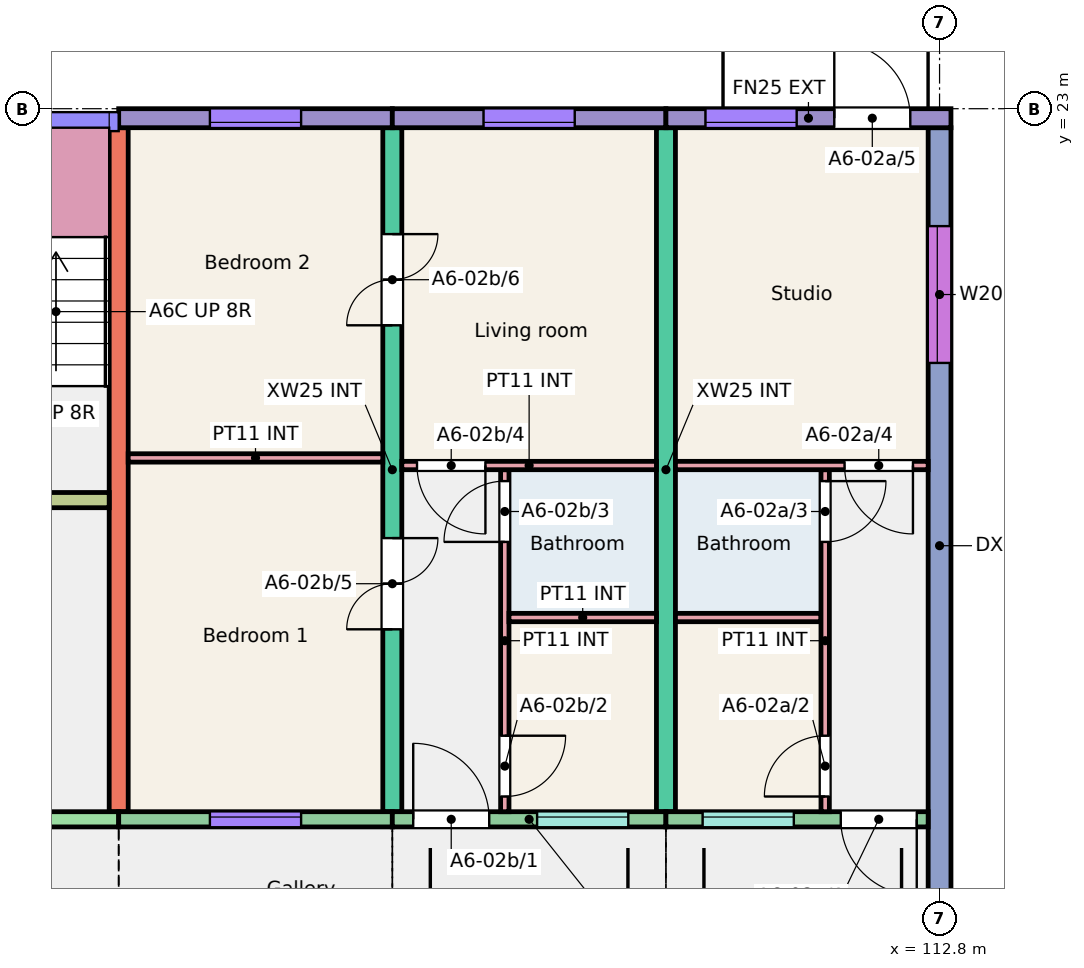
"""IFC4 building model, lengths in metres.
Left out: names, types, materials, properties, quantities, classifications, styles, units other than length and angle.
Written with IfcOpenShell. Run it as: python <this file> out.ifc"""

import sys

from ifc_helpers import new_model, si_unit, direction, frame, frame_2d, origin, place, context, subcontext, project, spatial, rectangle, extrude, element, fill, save


model = new_model("IFC4")
c1 = context("Model", 3, precision=1e-05, world=origin(), true_north=direction((0.0, 1.0)))
c2 = subcontext(c1, "Body", "Model", "MODEL_VIEW")
j1 = project(units=[si_unit("LENGTHUNIT", "METRE"), si_unit("PLANEANGLEUNIT", "RADIAN")], contexts=[c1])
p1 = place(None, origin())
s1 = spatial("IfcSite", under=j1, at=p1, CompositionType="ELEMENT")
p2 = place(p1, origin())
s2 = spatial("IfcBuilding", under=s1, at=p2, CompositionType="ELEMENT")
p3 = place(p2, frame((0.0, 0.0, 6.0)))
s3 = spatial("IfcBuildingStorey", under=s2, at=p3, CompositionType="ELEMENT", Elevation=6.0)
p4 = place(p3, frame((102.0, 13.75, 0.0), z_axis=(0.0, 0.0, 1.0), x_axis=(0.0, 1.0, 0.0)))
e1 = element("IfcWall", 1, at=p4, inside=s3, PredefinedType="SHEAR", context=c2, shape_type="SweptSolid", body=[
    extrude(rectangle(XDim=9.0, YDim=0.25, at=frame_2d((4.5, 0.0))), origin(), (0.0, 0.0, 1.0), 3.0),
])
p5 = place(p3, frame((105.6, 13.75, 0.0), z_axis=(0.0, 0.0, 1.0), x_axis=(0.0, 1.0, 0.0)))
e2 = element("IfcWall", 2, at=p5, inside=s3, PredefinedType="SHEAR", context=c2, shape_type="SweptSolid", body=[
    extrude(rectangle(XDim=9.0, YDim=0.25, at=frame_2d((4.5, 0.0))), origin(), (0.0, 0.0, 1.0), 3.0),
])
p6 = place(p5, frame((2.4, 0.0, 0.0)))
e3 = element("IfcOpeningElement", 3, at=p6, cuts=e2, PredefinedType="OPENING", context=c2, shape_type="SweptSolid", body=[
    extrude(rectangle(XDim=1.2, YDim=2.1, at=frame_2d((0.6, 1.05))), frame((0.0, 0.135, 0.0), z_axis=(0.0, -1.0, 0.0), x_axis=(1.0, 0.0, 0.0)), (0.0, 0.0, 1.0), 0.27),
])
p7 = place(p5, frame((6.4, 0.0, 0.0)))
e4 = element("IfcOpeningElement", 4, at=p7, cuts=e2, PredefinedType="OPENING", context=c2, shape_type="SweptSolid", body=[
    extrude(rectangle(XDim=1.2, YDim=2.1, at=frame_2d((0.6, 1.05))), frame((0.0, 0.135, 0.0), z_axis=(0.0, -1.0, 0.0), x_axis=(1.0, 0.0, 0.0)), (0.0, 0.0, 1.0), 0.27),
])
p8 = place(p3, frame((109.2, 13.75, 0.0), z_axis=(0.0, 0.0, 1.0), x_axis=(0.0, 1.0, 0.0)))
e5 = element("IfcWall", 5, at=p8, inside=s3, PredefinedType="SHEAR", context=c2, shape_type="SweptSolid", body=[
    extrude(rectangle(XDim=9.0, YDim=0.25, at=frame_2d((4.5, 0.0))), origin(), (0.0, 0.0, 1.0), 3.0),
])
p9 = place(p3, frame((112.8, 11.75, 0.0), z_axis=(0.0, 0.0, 1.0), x_axis=(0.0, 1.0, 0.0)))
e6 = element("IfcWall", 6, at=p9, inside=s3, PredefinedType="SHEAR", context=c2, shape_type="SweptSolid", body=[
    extrude(rectangle(XDim=11.0, YDim=0.3, at=frame_2d((5.5, 0.0))), origin(), (0.0, 0.0, 1.0), 3.0),
])
p10 = place(p9, frame((7.905, 0.0, 0.9)))
e7 = element("IfcOpeningElement", 7, at=p10, cuts=e6, PredefinedType="OPENING", context=c2, shape_type="SweptSolid", body=[
    extrude(rectangle(XDim=1.8, YDim=1.5, at=frame_2d((0.9, 0.75))), frame((0.0, 0.16, 0.0), z_axis=(0.0, -1.0, 0.0), x_axis=(1.0, 0.0, 0.0)), (0.0, 0.0, 1.0), 0.32),
])
p11 = place(p3, frame((96.15, 13.65, 0.0), z_axis=(0.0, 0.0, 1.0), x_axis=(1.0, 0.0, 0.0)))
e8 = element("IfcWall", 8, at=p11, inside=s3, PredefinedType="SHEAR", context=c2, shape_type="SweptSolid", body=[
    extrude(rectangle(XDim=5.85, YDim=0.2, at=frame_2d((2.925, 0.0))), origin(), (0.0, 0.0, 1.0), 3.0),
])
p12 = place(p11, frame((2.312, 0.0, 0.0)))
e9 = element("IfcOpeningElement", 9, at=p12, cuts=e8, PredefinedType="OPENING", context=c2, shape_type="SweptSolid", body=[
    extrude(rectangle(XDim=1.1, YDim=2.1, at=frame_2d((0.55, 1.05))), frame((0.0, 0.11, 0.0), z_axis=(0.0, -1.0, 0.0), x_axis=(1.0, 0.0, 0.0)), (0.0, 0.0, 1.0), 0.22),
])
p13 = place(p3, frame((96.15, 17.85, 0.0), z_axis=(0.0, 0.0, 1.0), x_axis=(1.0, 0.0, 0.0)))
e10 = element("IfcWall", 10, at=p13, inside=s3, PredefinedType="SHEAR", context=c2, shape_type="SweptSolid", body=[
    extrude(rectangle(XDim=5.725, YDim=0.2, at=frame_2d((2.863, 0.0))), origin(), (0.0, 0.0, 1.0), 3.0),
])
p14 = place(p13, frame((3.775, 0.0, 0.0)))
e11 = element("IfcOpeningElement", 11, at=p14, cuts=e10, PredefinedType="OPENING", context=c2, shape_type="SweptSolid", body=[
    extrude(rectangle(XDim=1.0, YDim=2.1, at=frame_2d((0.5, 1.05))), frame((0.0, 0.11, 0.0), z_axis=(0.0, -1.0, 0.0), x_axis=(1.0, 0.0, 0.0)), (0.0, 0.0, 1.0), 0.22),
])
p15 = place(p13, frame((0.762, 0.0, 0.0)))
e12 = element("IfcOpeningElement", 12, at=p15, cuts=e10, PredefinedType="OPENING", context=c2, shape_type="SweptSolid", body=[
    extrude(rectangle(XDim=1.1, YDim=2.1, at=frame_2d((0.55, 1.05))), frame((0.0, 0.11, 0.0), z_axis=(0.0, -1.0, 0.0), x_axis=(1.0, 0.0, 0.0)), (0.0, 0.0, 1.0), 0.22),
])
p16 = place(p3, frame((102.0, 22.875, 0.0), z_axis=(0.0, 0.0, 1.0), x_axis=(1.0, 0.0, 0.0)))
e13 = element("IfcWall", 13, at=p16, inside=s3, PredefinedType="SOLIDWALL", context=c2, shape_type="SweptSolid", body=[
    extrude(rectangle(XDim=3.6, YDim=0.25, at=frame_2d((1.8, 0.0))), origin(), (0.0, 0.0, 1.0), 3.0),
])
p17 = place(p16, frame((1.2, 0.0, 0.8)))
e14 = element("IfcOpeningElement", 14, at=p17, cuts=e13, PredefinedType="OPENING", context=c2, shape_type="SweptSolid", body=[
    extrude(rectangle(XDim=1.2, YDim=1.6, at=frame_2d((0.6, 0.8))), frame((0.0, 0.135, 0.0), z_axis=(0.0, -1.0, 0.0), x_axis=(1.0, 0.0, 0.0)), (0.0, 0.0, 1.0), 0.27),
])
p18 = place(p3, frame((102.0, 13.65, 0.0), z_axis=(0.0, 0.0, 1.0), x_axis=(1.0, 0.0, 0.0)))
e15 = element("IfcWall", 15, at=p18, inside=s3, PredefinedType="SOLIDWALL", context=c2, shape_type="SweptSolid", body=[
    extrude(rectangle(XDim=3.6, YDim=0.2, at=frame_2d((1.8, 0.0))), origin(), (0.0, 0.0, 1.0), 3.0),
])
p19 = place(p18, frame((1.2, 0.0, 0.8)))
e16 = element("IfcOpeningElement", 16, at=p19, cuts=e15, PredefinedType="OPENING", context=c2, shape_type="SweptSolid", body=[
    extrude(rectangle(XDim=1.2, YDim=1.6, at=frame_2d((0.6, 0.8))), frame((0.0, 0.11, 0.0), z_axis=(0.0, -1.0, 0.0), x_axis=(1.0, 0.0, 0.0)), (0.0, 0.0, 1.0), 0.22),
])
p20 = place(p3, frame((105.6, 22.875, 0.0), z_axis=(0.0, 0.0, 1.0), x_axis=(1.0, 0.0, 0.0)))
e17 = element("IfcWall", 17, at=p20, inside=s3, PredefinedType="SOLIDWALL", context=c2, shape_type="SweptSolid", body=[
    extrude(rectangle(XDim=3.6, YDim=0.25, at=frame_2d((1.8, 0.0))), origin(), (0.0, 0.0, 1.0), 3.0),
])
p21 = place(p20, frame((1.2, 0.0, 0.8)))
e18 = element("IfcOpeningElement", 18, at=p21, cuts=e17, PredefinedType="OPENING", context=c2, shape_type="SweptSolid", body=[
    extrude(rectangle(XDim=1.2, YDim=1.6, at=frame_2d((0.6, 0.8))), frame((0.0, 0.135, 0.0), z_axis=(0.0, -1.0, 0.0), x_axis=(1.0, 0.0, 0.0)), (0.0, 0.0, 1.0), 0.27),
])
p22 = place(p3, frame((105.6, 13.65, 0.0), z_axis=(0.0, 0.0, 1.0), x_axis=(1.0, 0.0, 0.0)))
e19 = element("IfcWall", 19, at=p22, inside=s3, PredefinedType="SOLIDWALL", context=c2, shape_type="SweptSolid", body=[
    extrude(rectangle(XDim=3.6, YDim=0.2, at=frame_2d((1.8, 0.0))), origin(), (0.0, 0.0, 1.0), 3.0),
])
p23 = place(p22, frame((1.905, 0.0, 1.1)))
e20 = element("IfcOpeningElement", 20, at=p23, cuts=e19, PredefinedType="OPENING", context=c2, shape_type="SweptSolid", body=[
    extrude(rectangle(XDim=1.2, YDim=1.3, at=frame_2d((0.6, 0.65))), frame((0.0, 0.11, 0.0), z_axis=(0.0, -1.0, 0.0), x_axis=(1.0, 0.0, 0.0)), (0.0, 0.0, 1.0), 0.22),
])
p24 = place(p22, frame((0.275, 0.0, 0.0)))
e21 = element("IfcOpeningElement", 21, at=p24, cuts=e19, PredefinedType="OPENING", context=c2, shape_type="SweptSolid", body=[
    extrude(rectangle(XDim=1.0, YDim=2.1, at=frame_2d((0.5, 1.05))), frame((0.0, 0.11, 0.0), z_axis=(0.0, -1.0, 0.0), x_axis=(1.0, 0.0, 0.0)), (0.0, 0.0, 1.0), 0.22),
])
p25 = place(p3, frame((109.2, 22.875, 0.0), z_axis=(0.0, 0.0, 1.0), x_axis=(1.0, 0.0, 0.0)))
e22 = element("IfcWall", 22, at=p25, inside=s3, PredefinedType="SOLIDWALL", context=c2, shape_type="SweptSolid", body=[
    extrude(rectangle(XDim=3.75, YDim=0.25, at=frame_2d((1.875, 0.0))), origin(), (0.0, 0.0, 1.0), 3.0),
])
p26 = place(p25, frame((0.52, 0.0, 0.8)))
e23 = element("IfcOpeningElement", 23, at=p26, cuts=e22, PredefinedType="OPENING", context=c2, shape_type="SweptSolid", body=[
    extrude(rectangle(XDim=1.2, YDim=1.6, at=frame_2d((0.6, 0.8))), frame((0.0, 0.135, 0.0), z_axis=(0.0, -1.0, 0.0), x_axis=(1.0, 0.0, 0.0)), (0.0, 0.0, 1.0), 0.27),
])
p27 = place(p25, frame((2.215, 0.0, 0.0)))
e24 = element("IfcOpeningElement", 24, at=p27, cuts=e22, PredefinedType="OPENING", context=c2, shape_type="SweptSolid", body=[
    extrude(rectangle(XDim=1.0, YDim=2.1, at=frame_2d((0.5, 1.05))), frame((0.0, 0.135, 0.0), z_axis=(0.0, -1.0, 0.0), x_axis=(1.0, 0.0, 0.0)), (0.0, 0.0, 1.0), 0.27),
])
p28 = place(p3, frame((109.2, 13.65, 0.0), z_axis=(0.0, 0.0, 1.0), x_axis=(1.0, 0.0, 0.0)))
e25 = element("IfcWall", 25, at=p28, inside=s3, PredefinedType="SOLIDWALL", context=c2, shape_type="SweptSolid", body=[
    extrude(rectangle(XDim=3.45, YDim=0.2, at=frame_2d((1.725, 0.0))), origin(), (0.0, 0.0, 1.0), 3.0),
])
p29 = place(p28, frame((0.482, 0.0, 1.1)))
e26 = element("IfcOpeningElement", 26, at=p29, cuts=e25, PredefinedType="OPENING", context=c2, shape_type="SweptSolid", body=[
    extrude(rectangle(XDim=1.2, YDim=1.3, at=frame_2d((0.6, 0.65))), frame((0.0, 0.11, 0.0), z_axis=(0.0, -1.0, 0.0), x_axis=(1.0, 0.0, 0.0)), (0.0, 0.0, 1.0), 0.22),
])
p30 = place(p28, frame((2.3, 0.0, 0.0)))
e27 = element("IfcOpeningElement", 27, at=p30, cuts=e25, PredefinedType="OPENING", context=c2, shape_type="SweptSolid", body=[
    extrude(rectangle(XDim=1.0, YDim=2.1, at=frame_2d((0.5, 1.05))), frame((0.0, 0.11, 0.0), z_axis=(0.0, -1.0, 0.0), x_axis=(1.0, 0.0, 0.0)), (0.0, 0.0, 1.0), 0.22),
])
p31 = place(p3, frame((109.325, 16.305, 0.0), z_axis=(0.0, 0.0, 1.0), x_axis=(1.0, 0.0, 0.0)))
e28 = element("IfcWall", 28, at=p31, inside=s3, PredefinedType="PARTITIONING", context=c2, shape_type="SweptSolid", body=[
    extrude(rectangle(XDim=1.915, YDim=0.11, at=frame_2d((0.958, 0.0))), origin(), (0.0, 0.0, 1.0), 2.8),
])
p32 = place(p3, frame((111.295, 13.75, 0.0), z_axis=(0.0, 0.0, 1.0), x_axis=(0.0, 1.0, 0.0)))
e29 = element("IfcWall", 29, at=p32, inside=s3, PredefinedType="PARTITIONING", context=c2, shape_type="SweptSolid", body=[
    extrude(rectangle(XDim=4.5, YDim=0.11, at=frame_2d((2.25, 0.0))), origin(), (0.0, 0.0, 1.0), 2.8),
])
p33 = place(p32, frame((0.2, 0.0, 0.0)))
e30 = element("IfcOpeningElement", 30, at=p33, cuts=e29, PredefinedType="OPENING", context=c2, shape_type="SweptSolid", body=[
    extrude(rectangle(XDim=0.8, YDim=2.1, at=frame_2d((0.4, 1.05))), frame((0.0, 0.065, 0.0), z_axis=(0.0, -1.0, 0.0), x_axis=(1.0, 0.0, 0.0)), (0.0, 0.0, 1.0), 0.13),
])
p34 = place(p32, frame((3.55, 0.0, 0.0)))
e31 = element("IfcOpeningElement", 31, at=p34, cuts=e29, PredefinedType="OPENING", context=c2, shape_type="SweptSolid", body=[
    extrude(rectangle(XDim=0.8, YDim=2.1, at=frame_2d((0.4, 1.05))), frame((0.0, 0.065, 0.0), z_axis=(0.0, -1.0, 0.0), x_axis=(1.0, 0.0, 0.0)), (0.0, 0.0, 1.0), 0.13),
])
p35 = place(p3, frame((109.325, 18.305, 0.0), z_axis=(0.0, 0.0, 1.0), x_axis=(1.0, 0.0, 0.0)))
e32 = element("IfcWall", 32, at=p35, inside=s3, PredefinedType="PARTITIONING", context=c2, shape_type="SweptSolid", body=[
    extrude(rectangle(XDim=3.325, YDim=0.11, at=frame_2d((1.663, 0.0))), origin(), (0.0, 0.0, 1.0), 2.8),
])
p36 = place(p35, frame((2.225, 0.0, 0.0)))
e33 = element("IfcOpeningElement", 33, at=p36, cuts=e32, PredefinedType="OPENING", context=c2, shape_type="SweptSolid", body=[
    extrude(rectangle(XDim=0.9, YDim=2.1, at=frame_2d((0.45, 1.05))), frame((0.0, 0.065, 0.0), z_axis=(0.0, -1.0, 0.0), x_axis=(1.0, 0.0, 0.0)), (0.0, 0.0, 1.0), 0.13),
])
p37 = place(p3, frame((107.08, 13.75, 0.0), z_axis=(0.0, 0.0, 1.0), x_axis=(0.0, 1.0, 0.0)))
e34 = element("IfcWall", 34, at=p37, inside=s3, PredefinedType="PARTITIONING", context=c2, shape_type="SweptSolid", body=[
    extrude(rectangle(XDim=4.5, YDim=0.11, at=frame_2d((2.25, 0.0))), origin(), (0.0, 0.0, 1.0), 2.8),
])
p38 = place(p37, frame((0.2, 0.0, 0.0)))
e35 = element("IfcOpeningElement", 35, at=p38, cuts=e34, PredefinedType="OPENING", context=c2, shape_type="SweptSolid", body=[
    extrude(rectangle(XDim=0.8, YDim=2.1, at=frame_2d((0.4, 1.05))), frame((0.0, 0.065, 0.0), z_axis=(0.0, -1.0, 0.0), x_axis=(1.0, 0.0, 0.0)), (0.0, 0.0, 1.0), 0.13),
])
p39 = place(p37, frame((3.55, 0.0, 0.0)))
e36 = element("IfcOpeningElement", 36, at=p39, cuts=e34, PredefinedType="OPENING", context=c2, shape_type="SweptSolid", body=[
    extrude(rectangle(XDim=0.8, YDim=2.1, at=frame_2d((0.4, 1.05))), frame((0.0, 0.065, 0.0), z_axis=(0.0, -1.0, 0.0), x_axis=(1.0, 0.0, 0.0)), (0.0, 0.0, 1.0), 0.13),
])
p40 = place(p3, frame((107.135, 16.305, 0.0), z_axis=(0.0, 0.0, 1.0), x_axis=(1.0, 0.0, 0.0)))
e37 = element("IfcWall", 37, at=p40, inside=s3, PredefinedType="PARTITIONING", context=c2, shape_type="SweptSolid", body=[
    extrude(rectangle(XDim=1.94, YDim=0.11, at=frame_2d((0.97, 0.0))), origin(), (0.0, 0.0, 1.0), 2.8),
])
p41 = place(p3, frame((105.725, 18.305, 0.0), z_axis=(0.0, 0.0, 1.0), x_axis=(1.0, 0.0, 0.0)))
e38 = element("IfcWall", 38, at=p41, inside=s3, PredefinedType="PARTITIONING", context=c2, shape_type="SweptSolid", body=[
    extrude(rectangle(XDim=3.35, YDim=0.11, at=frame_2d((1.675, 0.0))), origin(), (0.0, 0.0, 1.0), 2.8),
])
p42 = place(p41, frame((0.2, 0.0, 0.0)))
e39 = element("IfcOpeningElement", 39, at=p42, cuts=e38, PredefinedType="OPENING", context=c2, shape_type="SweptSolid", body=[
    extrude(rectangle(XDim=0.9, YDim=2.1, at=frame_2d((0.45, 1.05))), frame((0.0, 0.065, 0.0), z_axis=(0.0, -1.0, 0.0), x_axis=(1.0, 0.0, 0.0)), (0.0, 0.0, 1.0), 0.13),
])
p43 = place(p3, frame((102.125, 18.405, 0.0), z_axis=(0.0, 0.0, 1.0), x_axis=(1.0, 0.0, 0.0)))
e40 = element("IfcWall", 40, at=p43, inside=s3, PredefinedType="PARTITIONING", context=c2, shape_type="SweptSolid", body=[
    extrude(rectangle(XDim=3.35, YDim=0.11, at=frame_2d((1.675, 0.0))), origin(), (0.0, 0.0, 1.0), 2.8),
])
p44 = place(p29, origin())
e41 = element("IfcWindow", 41, at=p44, inside=s3, PartitioningType="SINGLE_PANEL", PredefinedType="WINDOW", context=c2, shape_type="SweptSolid", body=[
    extrude(rectangle(XDim=1.2, YDim=1.3, at=frame_2d((0.6, 0.65))), frame((0.0, 0.06, 0.0), z_axis=(0.0, -1.0, 0.0), x_axis=(1.0, 0.0, 0.0)), (0.0, 0.0, 1.0), 0.06),
])
fill(e26, e41)
p45 = place(p26, origin())
e42 = element("IfcWindow", 42, at=p45, inside=s3, PartitioningType="SINGLE_PANEL", PredefinedType="WINDOW", context=c2, shape_type="SweptSolid", body=[
    extrude(rectangle(XDim=1.2, YDim=1.6, at=frame_2d((0.6, 0.8))), frame((0.0, -0.025, 0.0), z_axis=(0.0, -1.0, 0.0), x_axis=(1.0, 0.0, 0.0)), (0.0, 0.0, 1.0), 0.06),
])
fill(e23, e42)
p46 = place(p10, origin())
e43 = element("IfcWindow", 43, at=p46, inside=s3, PartitioningType="SINGLE_PANEL", PredefinedType="WINDOW", context=c2, shape_type="SweptSolid", body=[
    extrude(rectangle(XDim=1.8, YDim=1.5, at=frame_2d((0.9, 0.75))), frame((0.0, 0.06, 0.0), z_axis=(0.0, -1.0, 0.0), x_axis=(1.0, 0.0, 0.0)), (0.0, 0.0, 1.0), 0.06),
])
fill(e7, e43)
p47 = place(p19, origin())
e44 = element("IfcWindow", 44, at=p47, inside=s3, PartitioningType="SINGLE_PANEL", PredefinedType="WINDOW", context=c2, shape_type="SweptSolid", body=[
    extrude(rectangle(XDim=1.2, YDim=1.6, at=frame_2d((0.6, 0.8))), frame((0.0, 0.06, 0.0), z_axis=(0.0, -1.0, 0.0), x_axis=(1.0, 0.0, 0.0)), (0.0, 0.0, 1.0), 0.06),
])
fill(e16, e44)
p48 = place(p17, origin())
e45 = element("IfcWindow", 45, at=p48, inside=s3, PartitioningType="SINGLE_PANEL", PredefinedType="WINDOW", context=c2, shape_type="SweptSolid", body=[
    extrude(rectangle(XDim=1.2, YDim=1.6, at=frame_2d((0.6, 0.8))), frame((0.0, -0.025, 0.0), z_axis=(0.0, -1.0, 0.0), x_axis=(1.0, 0.0, 0.0)), (0.0, 0.0, 1.0), 0.06),
])
fill(e14, e45)
p49 = place(p23, origin())
e46 = element("IfcWindow", 46, at=p49, inside=s3, PartitioningType="SINGLE_PANEL", PredefinedType="WINDOW", context=c2, shape_type="SweptSolid", body=[
    extrude(rectangle(XDim=1.2, YDim=1.3, at=frame_2d((0.6, 0.65))), frame((0.0, 0.06, 0.0), z_axis=(0.0, -1.0, 0.0), x_axis=(1.0, 0.0, 0.0)), (0.0, 0.0, 1.0), 0.06),
])
fill(e20, e46)
p50 = place(p21, origin())
e47 = element("IfcWindow", 47, at=p50, inside=s3, PartitioningType="SINGLE_PANEL", PredefinedType="WINDOW", context=c2, shape_type="SweptSolid", body=[
    extrude(rectangle(XDim=1.2, YDim=1.6, at=frame_2d((0.6, 0.8))), frame((0.0, -0.025, 0.0), z_axis=(0.0, -1.0, 0.0), x_axis=(1.0, 0.0, 0.0)), (0.0, 0.0, 1.0), 0.06),
])
fill(e18, e47)
p51 = place(p30, origin())
e48 = element("IfcDoor", 48, at=p51, inside=s3, OperationType="SINGLE_SWING_RIGHT", PredefinedType="DOOR", context=c2, shape_type="SweptSolid", body=[
    extrude(rectangle(XDim=1.0, YDim=2.1, at=frame_2d((0.5, 1.05))), frame((0.0, 0.025, 0.0), z_axis=(0.0, -1.0, 0.0), x_axis=(1.0, 0.0, 0.0)), (0.0, 0.0, 1.0), 0.05),
])
fill(e27, e48)
p52 = place(p33, origin())
e49 = element("IfcDoor", 49, at=p52, inside=s3, OperationType="SINGLE_SWING_LEFT", PredefinedType="DOOR", context=c2, shape_type="SweptSolid", body=[
    extrude(rectangle(XDim=0.8, YDim=2.1, at=frame_2d((0.4, 1.05))), frame((0.0, 0.025, 0.0), z_axis=(0.0, -1.0, 0.0), x_axis=(1.0, 0.0, 0.0)), (0.0, 0.0, 1.0), 0.05),
])
fill(e30, e49)
p53 = place(p34, origin())
e50 = element("IfcDoor", 50, at=p53, inside=s3, OperationType="SINGLE_SWING_RIGHT", PredefinedType="DOOR", context=c2, shape_type="SweptSolid", body=[
    extrude(rectangle(XDim=0.8, YDim=2.1, at=frame_2d((0.4, 1.05))), frame((0.0, 0.025, 0.0), z_axis=(0.0, -1.0, 0.0), x_axis=(1.0, 0.0, 0.0)), (0.0, 0.0, 1.0), 0.05),
])
fill(e31, e50)
p54 = place(p36, origin())
e51 = element("IfcDoor", 51, at=p54, inside=s3, OperationType="SINGLE_SWING_RIGHT", PredefinedType="DOOR", context=c2, shape_type="SweptSolid", body=[
    extrude(rectangle(XDim=0.9, YDim=2.1, at=frame_2d((0.45, 1.05))), frame((0.0, 0.025, 0.0), z_axis=(0.0, -1.0, 0.0), x_axis=(1.0, 0.0, 0.0)), (0.0, 0.0, 1.0), 0.05),
])
fill(e33, e51)
p55 = place(p27, origin())
e52 = element("IfcDoor", 52, at=p55, inside=s3, OperationType="SINGLE_SWING_LEFT", PredefinedType="DOOR", context=c2, shape_type="SweptSolid", body=[
    extrude(rectangle(XDim=1.0, YDim=2.1, at=frame_2d((0.5, 1.05))), frame((0.0, 0.025, 0.0), z_axis=(0.0, -1.0, 0.0), x_axis=(1.0, 0.0, 0.0)), (0.0, 0.0, 1.0), 0.05),
])
fill(e24, e52)
p56 = place(p24, origin())
e53 = element("IfcDoor", 53, at=p56, inside=s3, OperationType="SINGLE_SWING_LEFT", PredefinedType="DOOR", context=c2, shape_type="SweptSolid", body=[
    extrude(rectangle(XDim=1.0, YDim=2.1, at=frame_2d((0.5, 1.05))), frame((0.0, 0.025, 0.0), z_axis=(0.0, -1.0, 0.0), x_axis=(1.0, 0.0, 0.0)), (0.0, 0.0, 1.0), 0.05),
])
fill(e21, e53)
p57 = place(p38, origin())
e54 = element("IfcDoor", 54, at=p57, inside=s3, OperationType="SINGLE_SWING_RIGHT", PredefinedType="DOOR", context=c2, shape_type="SweptSolid", body=[
    extrude(rectangle(XDim=0.8, YDim=2.1, at=frame_2d((0.4, 1.05))), frame((0.0, 0.025, 0.0), z_axis=(0.0, -1.0, 0.0), x_axis=(1.0, 0.0, 0.0)), (0.0, 0.0, 1.0), 0.05),
])
fill(e35, e54)
p58 = place(p39, origin())
e55 = element("IfcDoor", 55, at=p58, inside=s3, OperationType="SINGLE_SWING_LEFT", PredefinedType="DOOR", context=c2, shape_type="SweptSolid", body=[
    extrude(rectangle(XDim=0.8, YDim=2.1, at=frame_2d((0.4, 1.05))), frame((0.0, 0.025, 0.0), z_axis=(0.0, -1.0, 0.0), x_axis=(1.0, 0.0, 0.0)), (0.0, 0.0, 1.0), 0.05),
])
fill(e36, e55)
p59 = place(p42, origin())
e56 = element("IfcDoor", 56, at=p59, inside=s3, OperationType="SINGLE_SWING_RIGHT", PredefinedType="DOOR", context=c2, shape_type="SweptSolid", body=[
    extrude(rectangle(XDim=0.9, YDim=2.1, at=frame_2d((0.45, 1.05))), frame((0.0, 0.025, 0.0), z_axis=(0.0, -1.0, 0.0), x_axis=(1.0, 0.0, 0.0)), (0.0, 0.0, 1.0), 0.05),
])
fill(e39, e56)
p60 = place(p6, origin())
e57 = element("IfcDoor", 57, at=p60, inside=s3, OperationType="DOUBLE_DOOR_SINGLE_SWING", PredefinedType="DOOR", context=c2, shape_type="SweptSolid", body=[
    extrude(rectangle(XDim=1.2, YDim=2.1, at=frame_2d((0.6, 1.05))), frame((0.0, 0.025, 0.0), z_axis=(0.0, -1.0, 0.0), x_axis=(1.0, 0.0, 0.0)), (0.0, 0.0, 1.0), 0.05),
])
fill(e3, e57)
p61 = place(p7, origin())
e58 = element("IfcDoor", 58, at=p61, inside=s3, OperationType="DOUBLE_DOOR_SINGLE_SWING", PredefinedType="DOOR", context=c2, shape_type="SweptSolid", body=[
    extrude(rectangle(XDim=1.2, YDim=2.1, at=frame_2d((0.6, 1.05))), frame((0.0, 0.025, 0.0), z_axis=(0.0, -1.0, 0.0), x_axis=(1.0, 0.0, 0.0)), (0.0, 0.0, 1.0), 0.05),
])
fill(e4, e58)
save(model, sys.argv[1])
